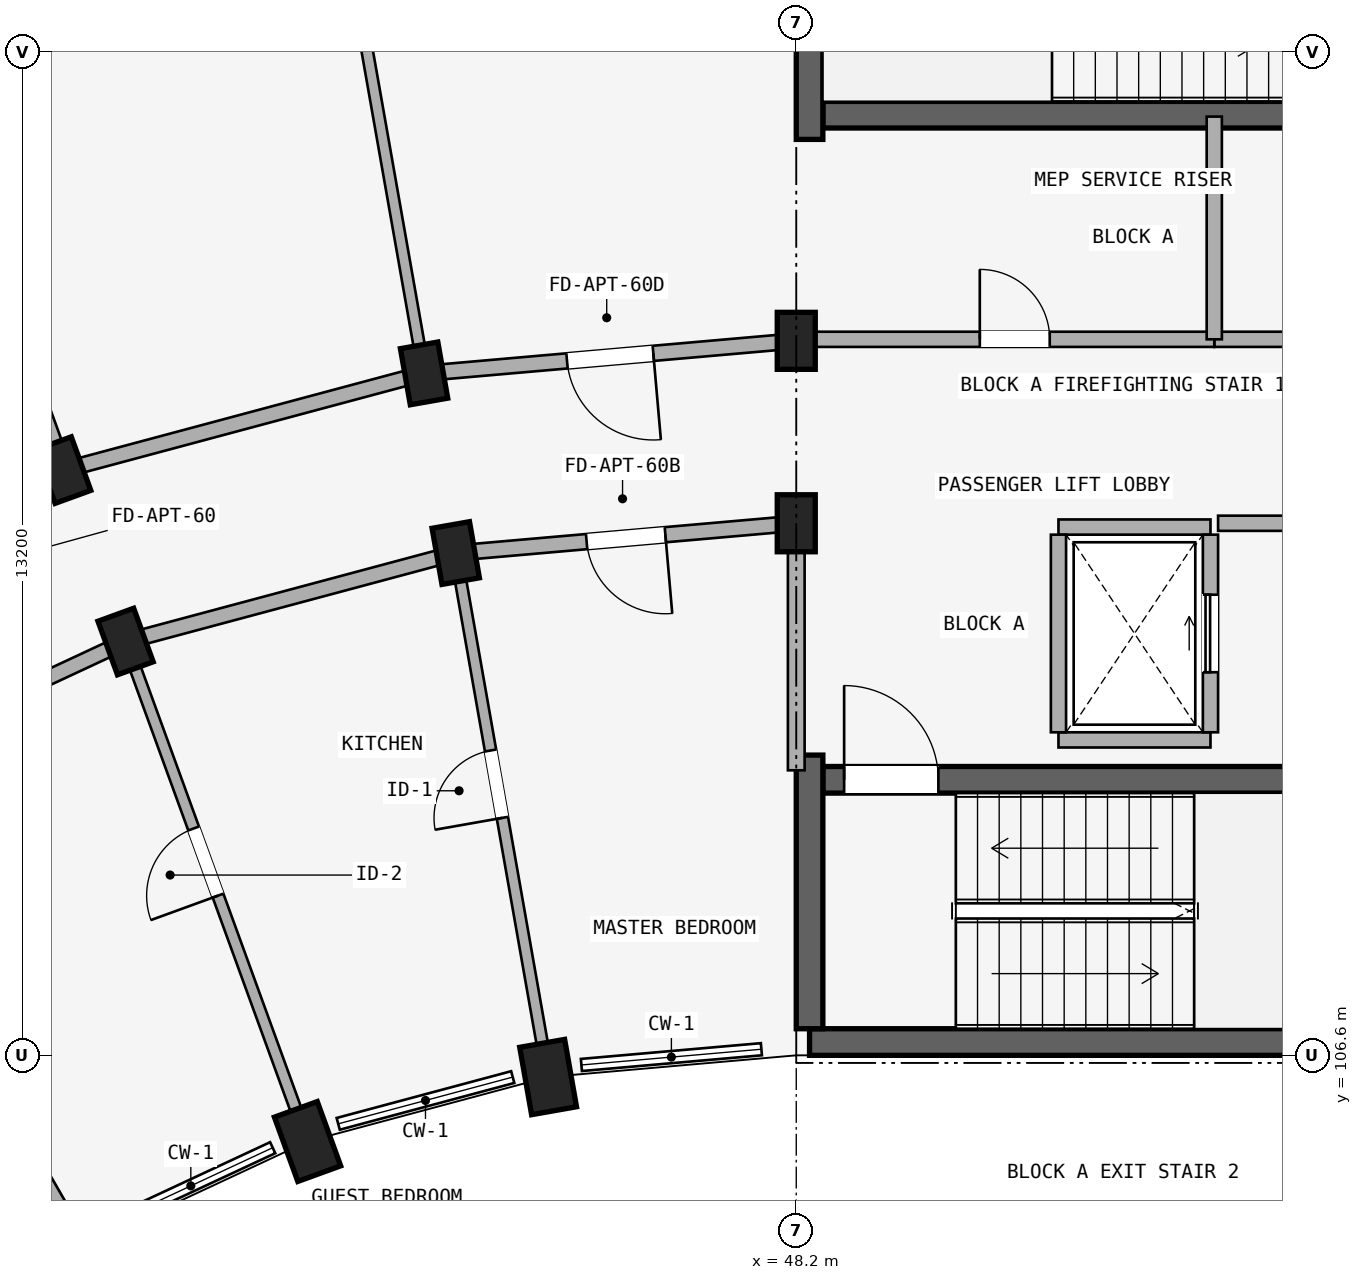
"""IFC4 building model, lengths in metres.
Left out: names, types, materials, properties, quantities, classifications, styles, units other than length and angle.
Written with IfcOpenShell. Run it as: python <this file> out.ifc"""

import sys

from ifc_helpers import new_model, si_unit, direction, frame, frame_2d, origin, origin_2d, place, context, subcontext, project, spatial, rectangle, extrude, element, fill, save


model = new_model("IFC4")
c1 = context("Model", 3, precision=1e-05, world=origin(), true_north=direction((0.0, 1.0)))
c2 = subcontext(c1, "Body", "Model", "MODEL_VIEW")
j1 = project(units=[si_unit("LENGTHUNIT", "METRE"), si_unit("PLANEANGLEUNIT", "RADIAN")], contexts=[c1])
p1 = place(None, origin())
s1 = spatial("IfcSite", under=j1, at=p1, CompositionType="ELEMENT")
p2 = place(p1, origin())
s2 = spatial("IfcBuilding", under=s1, at=p2, CompositionType="ELEMENT")
p3 = place(p2, frame((0.0, 0.0, 4.5)))
s3 = spatial("IfcBuildingStorey", under=s2, at=p3, CompositionType="ELEMENT", Elevation=4.5)
p4 = place(p3, frame((48.55, 118.975, 0.0), z_axis=(0.0, 0.0, 1.0), x_axis=(1.0, 0.0, 0.0)))
e1 = element("IfcWall", 1, at=p4, inside=s3, PredefinedType="SHEAR", context=c2, shape_type="SweptSolid", body=[
    extrude(rectangle(XDim=8.075, YDim=0.35, at=frame_2d((4.038, 0.0))), origin(), (0.0, 0.0, 1.0), 3.98),
])
p5 = place(p4, frame((6.38, 0.0, 0.0)))
e2 = element("IfcOpeningElement", 2, at=p5, cuts=e1, PredefinedType="OPENING", context=c2, shape_type="SweptSolid", body=[
    extrude(rectangle(XDim=1.24, YDim=2.15, at=frame_2d((0.62, 1.075))), frame((0.0, 0.185, 0.0), z_axis=(0.0, -1.0, 0.0), x_axis=(1.0, 0.0, 0.0)), (0.0, 0.0, 1.0), 0.37),
])
p6 = place(p3, frame((48.375, 118.65, 0.0), z_axis=(0.0, 0.0, 1.0), x_axis=(0.0, 1.0, 0.0)))
e3 = element("IfcWall", 3, at=p6, inside=s3, PredefinedType="SHEAR", context=c2, shape_type="SweptSolid", body=[
    extrude(rectangle(XDim=3.6, YDim=0.35, at=frame_2d((1.8, 0.0))), origin(), (0.0, 0.0, 1.0), 3.98),
])
p7 = place(p3, frame((48.375, 106.775, 0.0), z_axis=(0.0, 0.0, 1.0), x_axis=(1.0, 0.0, 0.0)))
e4 = element("IfcWall", 4, at=p7, inside=s3, PredefinedType="SHEAR", context=c2, shape_type="SweptSolid", body=[
    extrude(rectangle(XDim=8.25, YDim=0.35, at=frame_2d((4.125, 0.0))), origin(), (0.0, 0.0, 1.0), 3.98),
])
p8 = place(p3, frame((48.55, 110.225, 0.0), z_axis=(0.0, 0.0, 1.0), x_axis=(1.0, 0.0, 0.0)))
e5 = element("IfcWall", 5, at=p8, inside=s3, PredefinedType="SHEAR", context=c2, shape_type="SweptSolid", body=[
    extrude(rectangle(XDim=7.9, YDim=0.35, at=frame_2d((3.95, 0.0))), origin(), (0.0, 0.0, 1.0), 3.98),
])
p9 = place(p8, frame((0.28, 0.0, 0.0)))
e6 = element("IfcOpeningElement", 6, at=p9, cuts=e5, PredefinedType="OPENING", context=c2, shape_type="SweptSolid", body=[
    extrude(rectangle(XDim=1.24, YDim=2.15, at=frame_2d((0.62, 1.075))), frame((0.0, 0.185, 0.0), z_axis=(0.0, -1.0, 0.0), x_axis=(1.0, 0.0, 0.0)), (0.0, 0.0, 1.0), 0.37),
])
p10 = place(p3, frame((48.375, 106.95, 0.0), z_axis=(0.0, 0.0, 1.0), x_axis=(0.0, 1.0, 0.0)))
e7 = element("IfcWall", 7, at=p10, inside=s3, PredefinedType="SHEAR", context=c2, shape_type="SweptSolid", body=[
    extrude(rectangle(XDim=3.6, YDim=0.35, at=frame_2d((1.8, 0.0))), origin(), (0.0, 0.0, 1.0), 3.98),
])
for number, where, z_axis, x_axis in (
    (8, (48.2, 113.6, 0.0), (0.0, 0.0, 1.0), (1.0, 0.0, 0.0)),
    (9, (48.2, 116.0, 0.0), (0.0, 0.0, 1.0), (1.0, 0.0, 0.0)),
):
    element("IfcColumn", number, at=place(p3, frame(where, z_axis=z_axis, x_axis=x_axis)), inside=s3, PredefinedType="COLUMN", context=c2, shape_type="SweptSolid", body=[
        extrude(rectangle(XDim=0.5, YDim=0.75, at=origin_2d()), origin(), (0.0, 0.0, 1.0), 3.98),
    ])
p11 = place(p3, frame((44.935, 106.314, 0.0), z_axis=(0.0, 0.0, 1.0), x_axis=(0.984807753012, 0.173648177667, 0.0)))
e10 = element("IfcColumn", 10, at=p11, inside=s3, PredefinedType="COLUMN", context=c2, shape_type="SweptSolid", body=[
    extrude(rectangle(XDim=0.6, YDim=0.9, at=origin_2d()), origin(), (0.0, 0.0, 1.0), 3.98),
])
for number, where, z_axis, x_axis in (
    (11, (43.72, 113.208, 0.0), (0.0, 0.0, 1.0), (0.985, 0.174, 0.0)),
    (12, (43.303, 115.572, 0.0), (0.0, 0.0, 1.0), (0.985, 0.174, 0.0)),
):
    element("IfcColumn", number, at=place(p3, frame(where, z_axis=z_axis, x_axis=x_axis)), inside=s3, PredefinedType="COLUMN", context=c2, shape_type="SweptSolid", body=[
        extrude(rectangle(XDim=0.5, YDim=0.75, at=origin_2d()), origin(), (0.0, 0.0, 1.0), 3.98),
    ])
p12 = place(p3, frame((41.77, 105.466, 0.0), z_axis=(0.0, 0.0, 1.0), x_axis=(0.939692620786, 0.342020143326, 0.0)))
e13 = element("IfcColumn", 13, at=p12, inside=s3, PredefinedType="COLUMN", context=c2, shape_type="SweptSolid", body=[
    extrude(rectangle(XDim=0.6, YDim=0.9, at=origin_2d()), origin(), (0.0, 0.0, 1.0), 3.98),
])
for number, where, z_axis, x_axis in (
    (14, (39.376, 112.044, 0.0), (0.0, 0.0, 1.0), (0.94, 0.342, 0.0)),
    (15, (38.555, 114.299, 0.0), (0.0, 0.0, 1.0), (0.94, 0.342, 0.0)),
):
    element("IfcColumn", number, at=place(p3, frame(where, z_axis=z_axis, x_axis=x_axis)), inside=s3, PredefinedType="COLUMN", context=c2, shape_type="SweptSolid", body=[
        extrude(rectangle(XDim=0.5, YDim=0.75, at=origin_2d()), origin(), (0.0, 0.0, 1.0), 3.98),
    ])
p13 = place(p3, frame((53.7, 116.02, 0.0), z_axis=(0.0, 0.0, 1.0), x_axis=(1.0, 0.0, 0.0)))
e16 = element("IfcWall", 16, at=p13, inside=s3, PredefinedType="STANDARD", context=c2, shape_type="SweptSolid", body=[
    extrude(rectangle(XDim=5.65, YDim=0.2, at=frame_2d((2.825, 0.0))), origin(), (0.0, 0.0, 1.0), 3.322),
])
p14 = place(p13, frame((1.923, 0.0, 0.0)))
e17 = element("IfcOpeningElement", 17, at=p14, cuts=e16, PredefinedType="OPENING", context=c2, shape_type="SweptSolid", body=[
    extrude(rectangle(XDim=1.24, YDim=2.15, at=frame_2d((0.62, 1.075))), frame((0.0, 0.11, 0.0), z_axis=(0.0, -1.0, 0.0), x_axis=(1.0, 0.0, 0.0)), (0.0, 0.0, 1.0), 0.22),
])
p15 = place(p3, frame((48.45, 116.02, 0.0), z_axis=(0.0, 0.0, 1.0), x_axis=(1.0, 0.0, 0.0)))
e18 = element("IfcWall", 18, at=p15, inside=s3, PredefinedType="STANDARD", context=c2, shape_type="SweptSolid", body=[
    extrude(rectangle(XDim=5.25, YDim=0.2, at=frame_2d((2.625, 0.0))), origin(), (0.0, 0.0, 1.0), 3.322),
])
p16 = place(p15, frame((2.165, 0.0, 0.0)))
e19 = element("IfcOpeningElement", 19, at=p16, cuts=e18, PredefinedType="OPENING", context=c2, shape_type="SweptSolid", body=[
    extrude(rectangle(XDim=0.92, YDim=2.1, at=frame_2d((0.46, 1.05))), frame((0.0, 0.11, 0.0), z_axis=(0.0, -1.0, 0.0), x_axis=(1.0, 0.0, 0.0)), (0.0, 0.0, 1.0), 0.22),
])
p17 = place(p3, frame((53.7, 116.02, 0.0), z_axis=(0.0, 0.0, 1.0), x_axis=(0.0, 1.0, 0.0)))
e20 = element("IfcWall", 20, at=p17, inside=s3, PredefinedType="STANDARD", context=c2, shape_type="SweptSolid", body=[
    extrude(rectangle(XDim=2.93, YDim=0.2, at=frame_2d((1.465, 0.0))), origin(), (0.0, 0.0, 1.0), 3.322),
])
p18 = place(p3, frame((51.65, 110.75, 0.0), z_axis=(0.0, 0.0, 1.0), x_axis=(1.0, 0.0, 0.0)))
e21 = element("IfcWall", 21, at=p18, inside=s3, PredefinedType="STANDARD", context=c2, shape_type="SweptSolid", body=[
    extrude(rectangle(XDim=2.0, YDim=0.2, at=frame_2d((1.0, 0.0))), origin(), (0.0, 0.0, 1.0), 3.98),
])
p19 = place(p3, frame((51.65, 113.55, 0.0), z_axis=(0.0, 0.0, 1.0), x_axis=(1.0, 0.0, 0.0)))
e22 = element("IfcWall", 22, at=p19, inside=s3, PredefinedType="STANDARD", context=c2, shape_type="SweptSolid", body=[
    extrude(rectangle(XDim=2.0, YDim=0.2, at=frame_2d((1.0, 0.0))), origin(), (0.0, 0.0, 1.0), 3.322),
])
p20 = place(p3, frame((51.65, 110.85, 0.0), z_axis=(0.0, 0.0, 1.0), x_axis=(0.0, 1.0, 0.0)))
e23 = element("IfcWall", 23, at=p20, inside=s3, PredefinedType="STANDARD", context=c2, shape_type="SweptSolid", body=[
    extrude(rectangle(XDim=2.6, YDim=0.2, at=frame_2d((1.3, 0.0))), origin(), (0.0, 0.0, 1.0), 3.322),
])
p21 = place(p3, frame((53.65, 110.85, 0.0), z_axis=(0.0, 0.0, 1.0), x_axis=(0.0, 1.0, 0.0)))
e24 = element("IfcWall", 24, at=p21, inside=s3, PredefinedType="STANDARD", context=c2, shape_type="SweptSolid", body=[
    extrude(rectangle(XDim=2.6, YDim=0.2, at=frame_2d((1.3, 0.0))), origin(), (0.0, 0.0, 1.0), 3.322),
])
p22 = place(p21, frame((0.79, 0.0, 0.0)))
e25 = element("IfcOpeningElement", 25, at=p22, cuts=e24, PredefinedType="OPENING", context=c2, shape_type="SweptSolid", body=[
    extrude(rectangle(XDim=1.02, YDim=2.15, at=frame_2d((0.51, 1.075))), frame((0.0, 0.11, 0.0), z_axis=(0.0, -1.0, 0.0), x_axis=(1.0, 0.0, 0.0)), (0.0, 0.0, 1.0), 0.22),
])
p23 = place(p3, frame((53.75, 113.6, 0.0), z_axis=(0.0, 0.0, 1.0), x_axis=(1.0, 0.0, 0.0)))
e26 = element("IfcWall", 26, at=p23, inside=s3, PredefinedType="STANDARD", context=c2, shape_type="SweptSolid", body=[
    extrude(rectangle(XDim=5.6, YDim=0.2, at=frame_2d((2.8, 0.0))), origin(), (0.0, 0.0, 1.0), 3.322),
])
p24 = place(p23, frame((1.91, 0.0, 0.0)))
e27 = element("IfcOpeningElement", 27, at=p24, cuts=e26, PredefinedType="OPENING", context=c2, shape_type="SweptSolid", body=[
    extrude(rectangle(XDim=1.22, YDim=2.15, at=frame_2d((0.61, 1.075))), frame((0.0, 0.11, 0.0), z_axis=(0.0, -1.0, 0.0), x_axis=(1.0, 0.0, 0.0)), (0.0, 0.0, 1.0), 0.22),
])
p25 = place(p3, frame((48.2, 113.6, 0.0), z_axis=(0.0, 0.0, 1.0), x_axis=(-0.996191949488, -0.087187153726, 0.0)))
e28 = element("IfcWall", 28, at=p25, inside=s3, PredefinedType="STANDARD", context=c2, shape_type="SweptSolid", body=[
    extrude(rectangle(XDim=4.497, YDim=0.2, at=frame_2d((2.249, 0.0))), origin(), (0.0, 0.0, 1.0), 3.322),
])
p26 = place(p25, frame((1.729, 0.0, 0.0)))
e29 = element("IfcOpeningElement", 29, at=p26, cuts=e28, PredefinedType="OPENING", context=c2, shape_type="SweptSolid", body=[
    extrude(rectangle(XDim=1.04, YDim=2.15, at=frame_2d((0.52, 1.075))), frame((0.0, 0.11, 0.0), z_axis=(0.0, -1.0, 0.0), x_axis=(1.0, 0.0, 0.0)), (0.0, 0.0, 1.0), 0.22),
])
p27 = place(p3, frame((48.2, 116.0, 0.0), z_axis=(0.0, 0.0, 1.0), x_axis=(-0.996193663584, -0.087167566415, 0.0)))
e30 = element("IfcWall", 30, at=p27, inside=s3, PredefinedType="STANDARD", context=c2, shape_type="SweptSolid", body=[
    extrude(rectangle(XDim=4.916, YDim=0.2, at=frame_2d((2.458, 0.0))), origin(), (0.0, 0.0, 1.0), 3.322),
])
p28 = place(p27, frame((1.888, 0.0, 0.0)))
e31 = element("IfcOpeningElement", 31, at=p28, cuts=e30, PredefinedType="OPENING", context=c2, shape_type="SweptSolid", body=[
    extrude(rectangle(XDim=1.14, YDim=2.15, at=frame_2d((0.57, 1.075))), frame((0.0, 0.11, 0.0), z_axis=(0.0, -1.0, 0.0), x_axis=(1.0, 0.0, 0.0)), (0.0, 0.0, 1.0), 0.22),
])
p29 = place(p3, frame((43.72, 113.208, 0.0), z_axis=(0.0, 0.0, 1.0), x_axis=(-0.965934240054, -0.258787642463, 0.0)))
e32 = element("IfcWall", 32, at=p29, inside=s3, PredefinedType="STANDARD", context=c2, shape_type="SweptSolid", body=[
    extrude(rectangle(XDim=4.497, YDim=0.2, at=frame_2d((2.249, 0.0))), origin(), (0.0, 0.0, 1.0), 3.322),
])
p30 = place(p3, frame((43.303, 115.572, 0.0), z_axis=(0.0, 0.0, 1.0), x_axis=(-0.965930095386, -0.258803112091, 0.0)))
e33 = element("IfcWall", 33, at=p30, inside=s3, PredefinedType="STANDARD", context=c2, shape_type="SweptSolid", body=[
    extrude(rectangle(XDim=4.916, YDim=0.2, at=frame_2d((2.458, 0.0))), origin(), (0.0, 0.0, 1.0), 3.322),
])
p31 = place(p3, frame((39.376, 112.044, 0.0), z_axis=(0.0, 0.0, 1.0), x_axis=(-0.906307919131, -0.422617978463, 0.0)))
e34 = element("IfcWall", 34, at=p31, inside=s3, PredefinedType="STANDARD", context=c2, shape_type="SweptSolid", body=[
    extrude(rectangle(XDim=4.497, YDim=0.2, at=frame_2d((2.249, 0.0))), origin(), (0.0, 0.0, 1.0), 3.322),
])
p32 = place(p3, frame((38.555, 114.299, 0.0), z_axis=(0.0, 0.0, 1.0), x_axis=(-0.906302381024, -0.422629854778, 0.0)))
e35 = element("IfcWall", 35, at=p32, inside=s3, PredefinedType="STANDARD", context=c2, shape_type="SweptSolid", body=[
    extrude(rectangle(XDim=4.915, YDim=0.2, at=frame_2d((2.458, 0.0))), origin(), (0.0, 0.0, 1.0), 3.322),
])
p33 = place(p32, frame((1.958, 0.0, 0.0)))
e36 = element("IfcOpeningElement", 36, at=p33, cuts=e35, PredefinedType="OPENING", context=c2, shape_type="SweptSolid", body=[
    extrude(rectangle(XDim=1.0, YDim=2.15, at=frame_2d((0.5, 1.075))), frame((0.0, 0.11, 0.0), z_axis=(0.0, -1.0, 0.0), x_axis=(1.0, 0.0, 0.0)), (0.0, 0.0, 1.0), 0.22),
])
p34 = place(p3, frame((48.2, 110.35, 0.0), z_axis=(0.0, 0.0, 1.0), x_axis=(0.0, 1.0, 0.0)))
e37 = element("IfcWall", 37, at=p34, inside=s3, PredefinedType="STANDARD", context=c2, shape_type="SweptSolid", body=[
    extrude(rectangle(XDim=3.2, YDim=0.22, at=frame_2d((1.6, 0.0))), origin(), (0.0, 0.0, 1.0), 3.322),
])
p35 = place(p3, frame((44.901, 106.511, 0.0), z_axis=(0.0, 0.0, 1.0), x_axis=(-0.173647089161, 0.984807944945, 0.0)))
e38 = element("IfcWall", 38, at=p35, inside=s3, PredefinedType="PARTITIONING", context=c2, shape_type="SweptSolid", body=[
    extrude(rectangle(XDim=6.75, YDim=0.15, at=frame_2d((3.375, 0.0))), origin(), (0.0, 0.0, 1.0), 3.322),
])
p36 = place(p35, frame((3.262, 0.0, 0.0)))
e39 = element("IfcOpeningElement", 39, at=p36, cuts=e38, PredefinedType="OPENING", context=c2, shape_type="SweptSolid", body=[
    extrude(rectangle(XDim=0.9, YDim=2.1, at=frame_2d((0.45, 1.05))), frame((0.0, 0.085, 0.0), z_axis=(0.0, -1.0, 0.0), x_axis=(1.0, 0.0, 0.0)), (0.0, 0.0, 1.0), 0.17),
])
p37 = place(p3, frame((43.286, 115.67, 0.0), z_axis=(0.0, 0.0, 1.0), x_axis=(-0.173646216546, 0.984808098809, 0.0)))
e40 = element("IfcWall", 40, at=p37, inside=s3, PredefinedType="PARTITIONING", context=c2, shape_type="SweptSolid", body=[
    extrude(rectangle(XDim=17.42, YDim=0.15, at=frame_2d((8.71, 0.0))), origin(), (0.0, 0.0, 1.0), 3.322),
])
p38 = place(p37, frame((7.5, 0.0, 0.0)))
e41 = element("IfcOpeningElement", 41, at=p38, cuts=e40, PredefinedType="OPENING", context=c2, shape_type="SweptSolid", body=[
    extrude(rectangle(XDim=0.8, YDim=2.1, at=frame_2d((0.4, 1.05))), frame((0.0, 0.085, 0.0), z_axis=(0.0, -1.0, 0.0), x_axis=(1.0, 0.0, 0.0)), (0.0, 0.0, 1.0), 0.17),
])
p39 = place(p3, frame((41.702, 105.654, 0.0), z_axis=(0.0, 0.0, 1.0), x_axis=(-0.342010221662, 0.939696231917, 0.0)))
e42 = element("IfcWall", 42, at=p39, inside=s3, PredefinedType="PARTITIONING", context=c2, shape_type="SweptSolid", body=[
    extrude(rectangle(XDim=6.75, YDim=0.15, at=frame_2d((3.375, 0.0))), origin(), (0.0, 0.0, 1.0), 3.322),
])
p40 = place(p39, frame((3.242, 0.0, 0.0)))
e43 = element("IfcOpeningElement", 43, at=p40, cuts=e42, PredefinedType="OPENING", context=c2, shape_type="SweptSolid", body=[
    extrude(rectangle(XDim=0.94, YDim=2.1, at=frame_2d((0.47, 1.05))), frame((0.0, 0.085, 0.0), z_axis=(0.0, -1.0, 0.0), x_axis=(1.0, 0.0, 0.0)), (0.0, 0.0, 1.0), 0.17),
])
p41 = place(p3, frame((38.521, 114.393, 0.0), z_axis=(0.0, 0.0, 1.0), x_axis=(-0.342022120477, 0.939691901159, 0.0)))
e44 = element("IfcWall", 44, at=p41, inside=s3, PredefinedType="STANDARD", context=c2, shape_type="SweptSolid", body=[
    extrude(rectangle(XDim=17.42, YDim=0.23, at=frame_2d((8.71, 0.0))), origin(), (0.0, 0.0, 1.0), 3.322),
])
p42 = place(p3, frame((38.7, 104.254, 0.0), z_axis=(0.0, 0.0, 1.0), x_axis=(-0.499997969693, 0.866026575979, 0.0)))
e45 = element("IfcWall", 45, at=p42, inside=s3, PredefinedType="STANDARD", context=c2, shape_type="SweptSolid", body=[
    extrude(rectangle(XDim=6.75, YDim=0.22, at=frame_2d((3.375, 0.0))), origin(), (0.0, 0.0, 1.0), 3.322),
])
p43 = place(p16, origin())
e46 = element("IfcDoor", 46, at=p43, inside=s3, OperationType="SINGLE_SWING_LEFT", PredefinedType="DOOR", context=c2, shape_type="SweptSolid", body=[
    extrude(rectangle(XDim=0.92, YDim=2.1, at=frame_2d((0.46, 1.05))), frame((0.0, 0.025, 0.0), z_axis=(0.0, -1.0, 0.0), x_axis=(1.0, 0.0, 0.0)), (0.0, 0.0, 1.0), 0.05),
])
fill(e19, e46)
p44 = place(p9, frame((1.24, 0.0, 0.0), z_axis=(0.0, 0.0, 1.0), x_axis=(-1.0, 0.0, 0.0)))
e47 = element("IfcDoor", 47, at=p44, inside=s3, OperationType="SINGLE_SWING_RIGHT", PredefinedType="DOOR", context=c2, shape_type="SweptSolid", body=[
    extrude(rectangle(XDim=1.24, YDim=2.15, at=frame_2d((0.62, 1.075))), frame((0.0, 0.025, 0.0), z_axis=(0.0, -1.0, 0.0), x_axis=(1.0, 0.0, 0.0)), (0.0, 0.0, 1.0), 0.05),
])
fill(e6, e47)
p45 = place(p22, origin())
e48 = element("IfcDoor", 48, at=p45, inside=s3, OperationType="SLIDING_TO_RIGHT", PredefinedType="DOOR", context=c2, shape_type="SweptSolid", body=[
    extrude(rectangle(XDim=1.02, YDim=2.15, at=frame_2d((0.51, 1.075))), frame((0.0, 0.025, 0.0), z_axis=(0.0, -1.0, 0.0), x_axis=(1.0, 0.0, 0.0)), (0.0, 0.0, 1.0), 0.05),
])
fill(e25, e48)
p46 = place(p36, frame((0.9, 0.0, 0.0), z_axis=(0.0, 0.0, 1.0), x_axis=(-1.0, 0.0, 0.0)))
e49 = element("IfcDoor", 49, at=p46, inside=s3, OperationType="SINGLE_SWING_RIGHT", PredefinedType="DOOR", context=c2, shape_type="SweptSolid", body=[
    extrude(rectangle(XDim=0.9, YDim=2.1, at=frame_2d((0.45, 1.05))), frame((0.0, 0.025, 0.0), z_axis=(0.0, -1.0, 0.0), x_axis=(1.0, 0.0, 0.0)), (0.0, 0.0, 1.0), 0.05),
])
fill(e39, e49)
p47 = place(p40, frame((0.94, 0.0, 0.0), z_axis=(0.0, 0.0, 1.0), x_axis=(-1.0, 0.0, 0.0)))
e50 = element("IfcDoor", 50, at=p47, inside=s3, OperationType="SINGLE_SWING_RIGHT", PredefinedType="DOOR", context=c2, shape_type="SweptSolid", body=[
    extrude(rectangle(XDim=0.94, YDim=2.1, at=frame_2d((0.47, 1.05))), frame((0.0, 0.025, 0.0), z_axis=(0.0, -1.0, 0.0), x_axis=(1.0, 0.0, 0.0)), (0.0, 0.0, 1.0), 0.05),
])
fill(e43, e50)
p48 = place(p28, origin())
e51 = element("IfcDoor", 51, at=p48, inside=s3, OperationType="SINGLE_SWING_LEFT", PredefinedType="DOOR", context=c2, shape_type="SweptSolid", body=[
    extrude(rectangle(XDim=1.14, YDim=2.15, at=frame_2d((0.57, 1.075))), frame((0.0, 0.025, 0.0), z_axis=(0.0, -1.0, 0.0), x_axis=(1.0, 0.0, 0.0)), (0.0, 0.0, 1.0), 0.05),
])
fill(e31, e51)
p49 = place(p26, origin())
e52 = element("IfcDoor", 52, at=p49, inside=s3, OperationType="SINGLE_SWING_LEFT", PredefinedType="DOOR", context=c2, shape_type="SweptSolid", body=[
    extrude(rectangle(XDim=1.04, YDim=2.15, at=frame_2d((0.52, 1.075))), frame((0.0, 0.025, 0.0), z_axis=(0.0, -1.0, 0.0), x_axis=(1.0, 0.0, 0.0)), (0.0, 0.0, 1.0), 0.05),
])
fill(e29, e52)
save(model, sys.argv[1])
